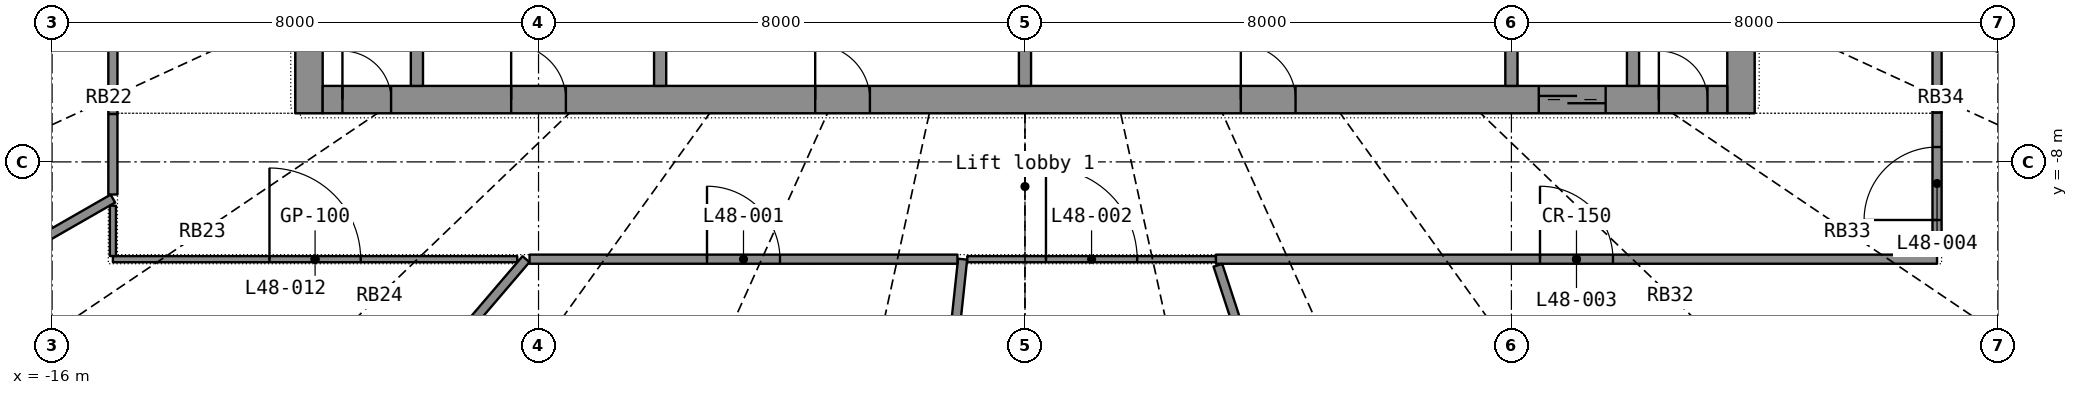
"""IFC4 building model, lengths in metres.
Left out: names, types, materials, properties, quantities, classifications, styles, units other than length and angle.
Written with IfcOpenShell. Run it as: python <this file> out.ifc"""

import sys

from ifc_helpers import new_model, si_unit, direction, frame, frame_2d, origin, place, context, subcontext, project, spatial, rectangle, extrude, element, fill, save


model = new_model("IFC4")
c1 = context("Model", 3, precision=1e-05, world=origin(), true_north=direction((0.0, 1.0)))
c2 = subcontext(c1, "Body", "Model", "MODEL_VIEW")
j1 = project(units=[si_unit("LENGTHUNIT", "METRE"), si_unit("PLANEANGLEUNIT", "RADIAN")], contexts=[c1])
p1 = place(None, origin())
s1 = spatial("IfcSite", under=j1, at=p1, CompositionType="ELEMENT")
p2 = place(p1, origin())
s2 = spatial("IfcBuilding", under=s1, at=p2, CompositionType="ELEMENT")
p3 = place(p2, frame((0.0, 0.0, 197.8)))
s3 = spatial("IfcBuildingStorey", under=s2, at=p3, CompositionType="ELEMENT", Elevation=197.8)
p4 = place(p3, frame((-11.775, -7.2, 0.0), z_axis=(0.0, 0.0, 1.0), x_axis=(0.0, 1.0, 0.0)))
e1 = element("IfcWall", 1, at=p4, inside=s3, PredefinedType="SHEAR", context=c2, shape_type="SweptSolid", body=[
    extrude(rectangle(XDim=14.4, YDim=0.45, at=frame_2d((7.2, 0.0))), origin(), (0.0, 0.0, 1.0), 3.3),
])
p5 = place(p4, frame((6.5, 0.0, 0.0)))
e2 = element("IfcOpeningElement", 2, at=p5, cuts=e1, PredefinedType="OPENING", context=c2, shape_type="SweptSolid", body=[
    extrude(rectangle(XDim=1.4, YDim=2.2, at=frame_2d((0.7, 1.1))), frame((0.0, 0.235, 0.0), z_axis=(0.0, -1.0, 0.0), x_axis=(1.0, 0.0, 0.0)), (0.0, 0.0, 1.0), 0.47),
])
p6 = place(p3, frame((11.775, -7.2, 0.0), z_axis=(0.0, 0.0, 1.0), x_axis=(0.0, 1.0, 0.0)))
e3 = element("IfcWall", 3, at=p6, inside=s3, PredefinedType="SHEAR", context=c2, shape_type="SweptSolid", body=[
    extrude(rectangle(XDim=14.4, YDim=0.45, at=frame_2d((7.2, 0.0))), origin(), (0.0, 0.0, 1.0), 3.3),
])
p7 = place(p6, frame((6.5, 0.0, 0.0)))
e4 = element("IfcOpeningElement", 4, at=p7, cuts=e3, PredefinedType="OPENING", context=c2, shape_type="SweptSolid", body=[
    extrude(rectangle(XDim=1.4, YDim=2.2, at=frame_2d((0.7, 1.1))), frame((0.0, 0.235, 0.0), z_axis=(0.0, -1.0, 0.0), x_axis=(1.0, 0.0, 0.0)), (0.0, 0.0, 1.0), 0.47),
])
p8 = place(p3, frame((-11.55, -6.975, 0.0), z_axis=(0.0, 0.0, 1.0), x_axis=(1.0, 0.0, 0.0)))
e5 = element("IfcWall", 5, at=p8, inside=s3, PredefinedType="SHEAR", context=c2, shape_type="SweptSolid", body=[
    extrude(rectangle(XDim=23.1, YDim=0.45, at=frame_2d((11.55, 0.0))), origin(), (0.0, 0.0, 1.0), 3.3),
])
p9 = place(p8, frame((20.0, 0.0, 0.0)))
e6 = element("IfcOpeningElement", 6, at=p9, cuts=e5, PredefinedType="OPENING", context=c2, shape_type="SweptSolid", body=[
    extrude(rectangle(XDim=1.1, YDim=2.2, at=frame_2d((0.55, 1.1))), frame((0.0, 0.235, 0.0), z_axis=(0.0, -1.0, 0.0), x_axis=(1.0, 0.0, 0.0)), (0.0, 0.0, 1.0), 0.47),
])
p10 = place(p8, frame((3.1, 0.0, 0.0)))
e7 = element("IfcOpeningElement", 7, at=p10, cuts=e5, PredefinedType="OPENING", context=c2, shape_type="SweptSolid", body=[
    extrude(rectangle(XDim=0.9, YDim=2.1, at=frame_2d((0.45, 1.05))), frame((0.0, 0.235, 0.0), z_axis=(0.0, -1.0, 0.0), x_axis=(1.0, 0.0, 0.0)), (0.0, 0.0, 1.0), 0.47),
])
p11 = place(p8, frame((8.1, 0.0, 0.0)))
e8 = element("IfcOpeningElement", 8, at=p11, cuts=e5, PredefinedType="OPENING", context=c2, shape_type="SweptSolid", body=[
    extrude(rectangle(XDim=0.9, YDim=2.1, at=frame_2d((0.45, 1.05))), frame((0.0, 0.235, 0.0), z_axis=(0.0, -1.0, 0.0), x_axis=(1.0, 0.0, 0.0)), (0.0, 0.0, 1.0), 0.47),
])
p12 = place(p8, frame((15.1, 0.0, 0.0)))
e9 = element("IfcOpeningElement", 9, at=p12, cuts=e5, PredefinedType="OPENING", context=c2, shape_type="SweptSolid", body=[
    extrude(rectangle(XDim=0.9, YDim=2.1, at=frame_2d((0.45, 1.05))), frame((0.0, 0.235, 0.0), z_axis=(0.0, -1.0, 0.0), x_axis=(1.0, 0.0, 0.0)), (0.0, 0.0, 1.0), 0.47),
])
p13 = place(p8, frame((0.325, 0.0, 0.0)))
e10 = element("IfcOpeningElement", 10, at=p13, cuts=e5, PredefinedType="OPENING", context=c2, shape_type="SweptSolid", body=[
    extrude(rectangle(XDim=0.8, YDim=2.05, at=frame_2d((0.4, 1.025))), frame((0.0, 0.235, 0.0), z_axis=(0.0, -1.0, 0.0), x_axis=(1.0, 0.0, 0.0)), (0.0, 0.0, 1.0), 0.47),
])
p14 = place(p8, frame((21.975, 0.0, 0.0)))
e11 = element("IfcOpeningElement", 11, at=p14, cuts=e5, PredefinedType="OPENING", context=c2, shape_type="SweptSolid", body=[
    extrude(rectangle(XDim=0.8, YDim=2.05, at=frame_2d((0.4, 1.025))), frame((0.0, 0.235, 0.0), z_axis=(0.0, -1.0, 0.0), x_axis=(1.0, 0.0, 0.0)), (0.0, 0.0, 1.0), 0.47),
])
for number, where, z_axis, x_axis in (
    (12, (-10.0, -6.75, 0.0), (0.0, 0.0, 1.0), (0.0, 1.0, 0.0)),
    (13, (8.0, -6.75, 0.0), (0.0, 0.0, 1.0), (0.0, 1.0, 0.0)),
    (14, (10.0, -6.75, 0.0), (0.0, 0.0, 1.0), (0.0, 1.0, 0.0)),
):
    element("IfcWall", number, at=place(p3, frame(where, z_axis=z_axis, x_axis=x_axis)), inside=s3, PredefinedType="SHEAR", context=c2, shape_type="SweptSolid", body=[
        extrude(rectangle(XDim=2.85, YDim=0.2, at=frame_2d((1.425, 0.0))), origin(), (0.0, 0.0, 1.0), 3.3),
    ])
for number, where, z_axis, x_axis in (
    (15, (-6.0, -6.75, 0.0), (0.0, 0.0, 1.0), (0.0, 1.0, 0.0)),
    (16, (0.0, -6.75, 0.0), (0.0, 0.0, 1.0), (0.0, 1.0, 0.0)),
):
    element("IfcWall", number, at=place(p3, frame(where, z_axis=z_axis, x_axis=x_axis)), inside=s3, PredefinedType="PARTITIONING", context=c2, shape_type="SweptSolid", body=[
        extrude(rectangle(XDim=2.85, YDim=0.2, at=frame_2d((1.425, 0.0))), origin(), (0.0, 0.0, 1.0), 3.3),
    ])
p15 = place(p3, frame((3.14, -9.6, 0.0), z_axis=(0.0, 0.0, 1.0), x_axis=(1.0, 0.0, 0.0)))
e17 = element("IfcWall", 17, at=p15, inside=s3, PredefinedType="PARTITIONING", context=c2, shape_type="SweptSolid", body=[
    extrude(rectangle(XDim=11.86, YDim=0.15, at=frame_2d((5.93, 0.0))), origin(), (0.0, 0.0, 1.0), 2.4),
])
p16 = place(p15, frame((5.33, 0.0, 0.0)))
e18 = element("IfcOpeningElement", 18, at=p16, cuts=e17, PredefinedType="OPENING", context=c2, shape_type="SweptSolid", body=[
    extrude(rectangle(XDim=1.2, YDim=2.2, at=frame_2d((0.6, 1.1))), frame((0.0, 0.085, 0.0), z_axis=(0.0, -1.0, 0.0), x_axis=(1.0, 0.0, 0.0)), (0.0, 0.0, 1.0), 0.17),
])
p17 = place(p3, frame((-1.971, -18.453, 0.0), z_axis=(0.0, 0.0, 1.0), x_axis=(0.106207781, 0.994343958, 0.0)))
e19 = element("IfcWall", 19, at=p17, inside=s3, PredefinedType="PARTITIONING", context=c2, shape_type="SweptSolid", body=[
    extrude(rectangle(XDim=8.903, YDim=0.15, at=frame_2d((4.451, 0.0))), origin(), (0.0, 0.0, 1.0), 2.4),
])
p18 = place(p3, frame((5.853, -17.893, 0.0), z_axis=(0.0, 0.0, 1.0), x_axis=(-0.310929285, 0.950433049, 0.0)))
e20 = element("IfcWall", 20, at=p18, inside=s3, PredefinedType="PARTITIONING", context=c2, shape_type="SweptSolid", body=[
    extrude(rectangle(XDim=8.62, YDim=0.15, at=frame_2d((4.31, 0.0))), origin(), (0.0, 0.0, 1.0), 2.4),
])
p19 = place(p3, frame((-8.207, -9.6, 0.0), z_axis=(0.0, 0.0, 1.0), x_axis=(-0.649790761, -0.760113128, 0.0)))
e21 = element("IfcWall", 21, at=p19, inside=s3, PredefinedType="PARTITIONING", context=c2, shape_type="SweptSolid", body=[
    extrude(rectangle(XDim=7.338, YDim=0.15, at=frame_2d((3.669, 0.0))), origin(), (0.0, 0.0, 1.0), 2.4),
])
p20 = place(p3, frame((-8.147, -9.6, 0.0), z_axis=(0.0, 0.0, 1.0), x_axis=(1.0, 0.0, 0.0)))
e22 = element("IfcWall", 22, at=p20, inside=s3, PredefinedType="PARTITIONING", context=c2, shape_type="SweptSolid", body=[
    extrude(rectangle(XDim=7.037, YDim=0.15, at=frame_2d((3.518, 0.0))), origin(), (0.0, 0.0, 1.0), 2.4),
])
p21 = place(p20, frame((2.918, 0.0, 0.0)))
e23 = element("IfcOpeningElement", 23, at=p21, cuts=e22, PredefinedType="OPENING", context=c2, shape_type="SweptSolid", body=[
    extrude(rectangle(XDim=1.2, YDim=2.2, at=frame_2d((0.6, 1.1))), frame((0.0, 0.085, 0.0), z_axis=(0.0, -1.0, 0.0), x_axis=(1.0, 0.0, 0.0)), (0.0, 0.0, 1.0), 0.17),
])
p22 = place(p3, frame((-15.0, -9.6, 0.0), z_axis=(0.0, 0.0, 1.0), x_axis=(1.0, 0.0, 0.0)))
e24 = element("IfcWall", 24, at=p22, inside=s3, PredefinedType="PARTITIONING", context=c2, shape_type="SweptSolid", body=[
    extrude(rectangle(XDim=6.65, YDim=0.1, at=frame_2d((3.325, 0.0))), origin(), (0.0, 0.0, 1.0), 2.4),
])
p23 = place(p22, frame((2.575, 0.0, 0.0)))
e25 = element("IfcOpeningElement", 25, at=p23, cuts=e24, PredefinedType="OPENING", context=c2, shape_type="SweptSolid", body=[
    extrude(rectangle(XDim=1.5, YDim=2.4, at=frame_2d((0.75, 1.2))), frame((0.0, 0.06, 0.0), z_axis=(0.0, -1.0, 0.0), x_axis=(1.0, 0.0, 0.0)), (0.0, 0.0, 1.0), 0.12),
])
p24 = place(p3, frame((20.515, -7.836, 0.0), z_axis=(0.0, 0.0, 1.0), x_axis=(-0.934186062, 0.356786213, 0.0)))
e26 = element("IfcWall", 26, at=p24, inside=s3, PredefinedType="PARTITIONING", context=c2, shape_type="SweptSolid", body=[
    extrude(rectangle(XDim=5.904, YDim=0.15, at=frame_2d((2.952, 0.0))), origin(), (0.0, 0.0, 1.0), 2.4),
])
p25 = place(p3, frame((-15.0, -1.8, 0.0), z_axis=(0.0, 0.0, 1.0), x_axis=(0.0, -1.0, 0.0)))
e27 = element("IfcWall", 27, at=p25, inside=s3, PredefinedType="PARTITIONING", context=c2, shape_type="SweptSolid", body=[
    extrude(rectangle(XDim=5.412, YDim=0.15, at=frame_2d((2.706, 0.0))), origin(), (0.0, 0.0, 1.0), 2.4),
])
p26 = place(p25, frame((2.106, 0.0, 0.0)))
e28 = element("IfcOpeningElement", 28, at=p26, cuts=e27, PredefinedType="OPENING", context=c2, shape_type="SweptSolid", body=[
    extrude(rectangle(XDim=1.2, YDim=2.2, at=frame_2d((0.6, 1.1))), frame((0.0, 0.085, 0.0), z_axis=(0.0, -1.0, 0.0), x_axis=(1.0, 0.0, 0.0)), (0.0, 0.0, 1.0), 0.17),
])
p27 = place(p3, frame((-0.949, -9.6, 0.0), z_axis=(0.0, 0.0, 1.0), x_axis=(1.0, 0.0, 0.0)))
e29 = element("IfcWall", 29, at=p27, inside=s3, PredefinedType="PARTITIONING", context=c2, shape_type="SweptSolid", body=[
    extrude(rectangle(XDim=4.088, YDim=0.1, at=frame_2d((2.044, 0.0))), origin(), (0.0, 0.0, 1.0), 2.4),
])
p28 = place(p27, frame((1.294, 0.0, 0.0)))
e30 = element("IfcOpeningElement", 30, at=p28, cuts=e29, PredefinedType="OPENING", context=c2, shape_type="SweptSolid", body=[
    extrude(rectangle(XDim=1.5, YDim=2.4, at=frame_2d((0.75, 1.2))), frame((0.0, 0.06, 0.0), z_axis=(0.0, -1.0, 0.0), x_axis=(1.0, 0.0, 0.0)), (0.0, 0.0, 1.0), 0.12),
])
p29 = place(p3, frame((-18.537, -10.632, 0.0), z_axis=(0.0, 0.0, 1.0), x_axis=(0.867438786, 0.49754392, 0.0)))
e31 = element("IfcWall", 31, at=p29, inside=s3, PredefinedType="PARTITIONING", context=c2, shape_type="SweptSolid", body=[
    extrude(rectangle(XDim=4.078, YDim=0.15, at=frame_2d((2.039, 0.0))), origin(), (0.0, 0.0, 1.0), 2.4),
])
p30 = place(p3, frame((15.0, -9.523, 0.0), z_axis=(0.0, 0.0, 1.0), x_axis=(0.0, 1.0, 0.0)))
e32 = element("IfcWall", 32, at=p30, inside=s3, PredefinedType="PARTITIONING", context=c2, shape_type="SweptSolid", body=[
    extrude(rectangle(XDim=2.335, YDim=0.15, at=frame_2d((1.167, 0.0))), origin(), (0.0, 0.0, 1.0), 2.4),
])
p31 = place(p30, frame((0.567, 0.0, 0.0)))
e33 = element("IfcOpeningElement", 33, at=p31, cuts=e32, PredefinedType="OPENING", context=c2, shape_type="SweptSolid", body=[
    extrude(rectangle(XDim=1.2, YDim=2.2, at=frame_2d((0.6, 1.1))), frame((0.0, 0.085, 0.0), z_axis=(0.0, -1.0, 0.0), x_axis=(1.0, 0.0, 0.0)), (0.0, 0.0, 1.0), 0.17),
])
p32 = place(p3, frame((15.0, -7.187, 0.0), z_axis=(0.0, 0.0, 1.0), x_axis=(0.0, 1.0, 0.0)))
e34 = element("IfcWall", 34, at=p32, inside=s3, PredefinedType="PARTITIONING", context=c2, shape_type="SweptSolid", body=[
    extrude(rectangle(XDim=1.347, YDim=0.15, at=frame_2d((0.673, 0.0))), origin(), (0.0, 0.0, 1.0), 2.4),
])
p33 = place(p3, frame((-15.0, -7.213, 0.0), z_axis=(0.0, 0.0, 1.0), x_axis=(0.0, -1.0, 0.0)))
e35 = element("IfcWall", 35, at=p33, inside=s3, PredefinedType="PARTITIONING", context=c2, shape_type="SweptSolid", body=[
    extrude(rectangle(XDim=1.323, YDim=0.15, at=frame_2d((0.662, 0.0))), origin(), (0.0, 0.0, 1.0), 2.4),
])
p34 = place(p3, frame((-15.0, -8.72, 0.0), z_axis=(0.0, 0.0, 1.0), x_axis=(0.0, -1.0, 0.0)))
e36 = element("IfcWall", 36, at=p34, inside=s3, PredefinedType="PARTITIONING", context=c2, shape_type="SweptSolid", body=[
    extrude(rectangle(XDim=0.828, YDim=0.1, at=frame_2d((0.414, 0.0))), origin(), (0.0, 0.0, 1.0), 2.4),
])
p35 = place(p9, origin())
e37 = element("IfcDoor", 37, at=p35, inside=s3, OperationType="DOUBLE_DOOR_SLIDING", PredefinedType="DOOR", context=c2, shape_type="SweptSolid", body=[
    extrude(rectangle(XDim=1.1, YDim=2.2, at=frame_2d((0.55, 1.1))), frame((0.0, 0.025, 0.0), z_axis=(0.0, -1.0, 0.0), x_axis=(1.0, 0.0, 0.0)), (0.0, 0.0, 1.0), 0.05),
])
fill(e6, e37)
p36 = place(p10, origin())
e38 = element("IfcDoor", 38, at=p36, inside=s3, OperationType="SINGLE_SWING_LEFT", PredefinedType="DOOR", context=c2, shape_type="SweptSolid", body=[
    extrude(rectangle(XDim=0.9, YDim=2.1, at=frame_2d((0.45, 1.05))), frame((0.0, 0.025, 0.0), z_axis=(0.0, -1.0, 0.0), x_axis=(1.0, 0.0, 0.0)), (0.0, 0.0, 1.0), 0.05),
])
fill(e7, e38)
p37 = place(p11, origin())
e39 = element("IfcDoor", 39, at=p37, inside=s3, OperationType="SINGLE_SWING_LEFT", PredefinedType="DOOR", context=c2, shape_type="SweptSolid", body=[
    extrude(rectangle(XDim=0.9, YDim=2.1, at=frame_2d((0.45, 1.05))), frame((0.0, 0.025, 0.0), z_axis=(0.0, -1.0, 0.0), x_axis=(1.0, 0.0, 0.0)), (0.0, 0.0, 1.0), 0.05),
])
fill(e8, e39)
p38 = place(p12, origin())
e40 = element("IfcDoor", 40, at=p38, inside=s3, OperationType="SINGLE_SWING_LEFT", PredefinedType="DOOR", context=c2, shape_type="SweptSolid", body=[
    extrude(rectangle(XDim=0.9, YDim=2.1, at=frame_2d((0.45, 1.05))), frame((0.0, 0.025, 0.0), z_axis=(0.0, -1.0, 0.0), x_axis=(1.0, 0.0, 0.0)), (0.0, 0.0, 1.0), 0.05),
])
fill(e9, e40)
p39 = place(p13, origin())
e41 = element("IfcDoor", 41, at=p39, inside=s3, OperationType="SINGLE_SWING_LEFT", PredefinedType="DOOR", context=c2, shape_type="SweptSolid", body=[
    extrude(rectangle(XDim=0.8, YDim=2.05, at=frame_2d((0.4, 1.025))), frame((0.0, 0.025, 0.0), z_axis=(0.0, -1.0, 0.0), x_axis=(1.0, 0.0, 0.0)), (0.0, 0.0, 1.0), 0.05),
])
fill(e10, e41)
p40 = place(p14, origin())
e42 = element("IfcDoor", 42, at=p40, inside=s3, OperationType="SINGLE_SWING_LEFT", PredefinedType="DOOR", context=c2, shape_type="SweptSolid", body=[
    extrude(rectangle(XDim=0.8, YDim=2.05, at=frame_2d((0.4, 1.025))), frame((0.0, 0.025, 0.0), z_axis=(0.0, -1.0, 0.0), x_axis=(1.0, 0.0, 0.0)), (0.0, 0.0, 1.0), 0.05),
])
fill(e11, e42)
p41 = place(p21, origin())
e43 = element("IfcDoor", 43, at=p41, inside=s3, OperationType="DOUBLE_DOOR_SINGLE_SWING", PredefinedType="DOOR", context=c2, shape_type="SweptSolid", body=[
    extrude(rectangle(XDim=1.2, YDim=2.2, at=frame_2d((0.6, 1.1))), frame((0.0, 0.025, 0.0), z_axis=(0.0, -1.0, 0.0), x_axis=(1.0, 0.0, 0.0)), (0.0, 0.0, 1.0), 0.05),
])
fill(e23, e43)
p42 = place(p28, origin())
e44 = element("IfcDoor", 44, at=p42, inside=s3, OperationType="DOUBLE_DOOR_SINGLE_SWING", PredefinedType="DOOR", context=c2, shape_type="SweptSolid", body=[
    extrude(rectangle(XDim=1.5, YDim=2.4, at=frame_2d((0.75, 1.2))), frame((0.0, 0.025, 0.0), z_axis=(0.0, -1.0, 0.0), x_axis=(1.0, 0.0, 0.0)), (0.0, 0.0, 1.0), 0.05),
])
fill(e30, e44)
p43 = place(p16, origin())
e45 = element("IfcDoor", 45, at=p43, inside=s3, OperationType="DOUBLE_DOOR_SINGLE_SWING", PredefinedType="DOOR", context=c2, shape_type="SweptSolid", body=[
    extrude(rectangle(XDim=1.2, YDim=2.2, at=frame_2d((0.6, 1.1))), frame((0.0, 0.025, 0.0), z_axis=(0.0, -1.0, 0.0), x_axis=(1.0, 0.0, 0.0)), (0.0, 0.0, 1.0), 0.05),
])
fill(e18, e45)
p44 = place(p31, origin())
e46 = element("IfcDoor", 46, at=p44, inside=s3, OperationType="DOUBLE_DOOR_SINGLE_SWING", PredefinedType="DOOR", context=c2, shape_type="SweptSolid", body=[
    extrude(rectangle(XDim=1.2, YDim=2.2, at=frame_2d((0.6, 1.1))), frame((0.0, 0.025, 0.0), z_axis=(0.0, -1.0, 0.0), x_axis=(1.0, 0.0, 0.0)), (0.0, 0.0, 1.0), 0.05),
])
fill(e33, e46)
p45 = place(p23, origin())
e47 = element("IfcDoor", 47, at=p45, inside=s3, OperationType="DOUBLE_DOOR_SINGLE_SWING", PredefinedType="DOOR", context=c2, shape_type="SweptSolid", body=[
    extrude(rectangle(XDim=1.5, YDim=2.4, at=frame_2d((0.75, 1.2))), frame((0.0, 0.025, 0.0), z_axis=(0.0, -1.0, 0.0), x_axis=(1.0, 0.0, 0.0)), (0.0, 0.0, 1.0), 0.05),
])
fill(e25, e47)
save(model, sys.argv[1])
